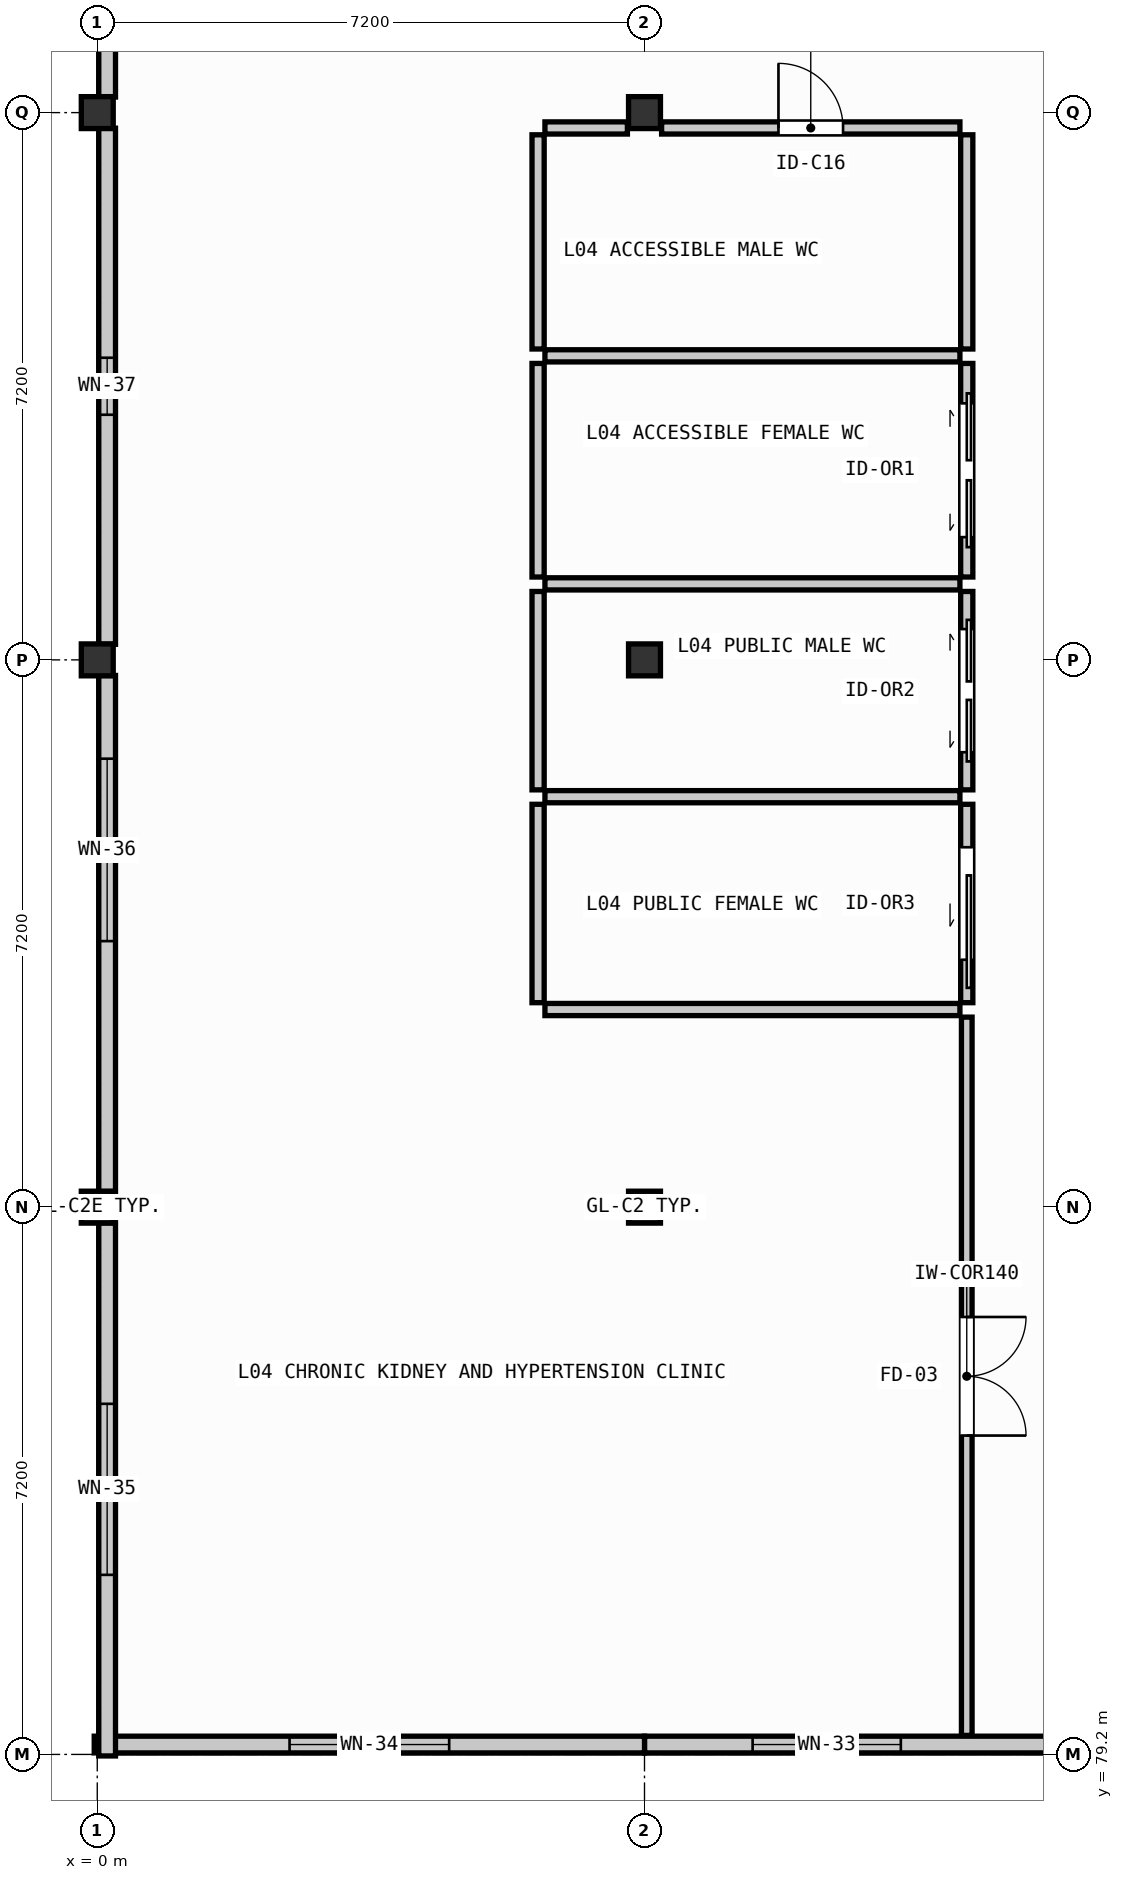
"""IFC4 building model, lengths in metres.
Left out: names, types, materials, properties, quantities, classifications, styles, units other than length and angle.
Written with IfcOpenShell. Run it as: python <this file> out.ifc"""

import sys

from ifc_helpers import new_model, si_unit, direction, frame, frame_2d, origin, origin_2d, place, context, subcontext, project, spatial, rectangle, extrude, element, fill, save


model = new_model("IFC4")
c1 = context("Model", 3, precision=1e-05, world=origin(), true_north=direction((0.0, 1.0)))
c2 = subcontext(c1, "Body", "Model", "MODEL_VIEW")
j1 = project(units=[si_unit("LENGTHUNIT", "METRE"), si_unit("PLANEANGLEUNIT", "RADIAN")], contexts=[c1])
p1 = place(None, origin())
s1 = spatial("IfcSite", under=j1, at=p1, CompositionType="ELEMENT")
p2 = place(p1, origin())
s2 = spatial("IfcBuilding", under=s1, at=p2, CompositionType="ELEMENT")
p3 = place(p2, frame((0.0, 0.0, 13.5)))
s3 = spatial("IfcBuildingStorey", under=s2, at=p3, CompositionType="ELEMENT", Elevation=13.5)
for number, where, z_axis, x_axis in (
    (1, (0.0, 86.4, 0.0), (0.0, 0.0, 1.0), (1.0, 0.0, 0.0)),
    (2, (0.0, 93.6, 0.0), (0.0, 0.0, 1.0), (1.0, 0.0, 0.0)),
    (3, (0.0, 100.8, 0.0), (0.0, 0.0, 1.0), (1.0, 0.0, 0.0)),
    (4, (7.2, 86.4, 0.0), (0.0, 0.0, 1.0), (1.0, 0.0, 0.0)),
    (5, (7.2, 93.6, 0.0), (0.0, 0.0, 1.0), (1.0, 0.0, 0.0)),
    (6, (7.2, 100.8, 0.0), (0.0, 0.0, 1.0), (1.0, 0.0, 0.0)),
):
    element("IfcColumn", number, at=place(p3, frame(where, z_axis=z_axis, x_axis=x_axis)), inside=s3, PredefinedType="COLUMN", context=c2, shape_type="SweptSolid", body=[
        extrude(rectangle(XDim=0.42, YDim=0.42, at=origin_2d()), origin(), (0.0, 0.0, 1.0), 3.99),
    ])
p4 = place(p3, frame((14.195, 79.33, 0.0), z_axis=(0.0, 0.0, 1.0), x_axis=(-1.0, 0.0, 0.0)))
e7 = element("IfcWall", 7, at=p4, inside=s3, PredefinedType="SOLIDWALL", context=c2, shape_type="SweptSolid", body=[
    extrude(rectangle(XDim=6.995, YDim=0.22, at=frame_2d((3.498, 0.0))), origin(), (0.0, 0.0, 1.0), 3.35),
])
p5 = place(p4, frame((3.623, 0.0, 0.95)))
e8 = element("IfcOpeningElement", 8, at=p5, cuts=e7, PredefinedType="OPENING", context=c2, shape_type="SweptSolid", body=[
    extrude(rectangle(XDim=1.95, YDim=1.25, at=frame_2d((0.975, 0.625))), frame((0.0, 0.12, 0.0), z_axis=(0.0, -1.0, 0.0), x_axis=(1.0, 0.0, 0.0)), (0.0, 0.0, 1.0), 0.24),
])
p6 = place(p3, frame((7.2, 79.33, 0.0), z_axis=(0.0, 0.0, 1.0), x_axis=(-1.0, 0.0, 0.0)))
e9 = element("IfcWall", 9, at=p6, inside=s3, PredefinedType="SOLIDWALL", context=c2, shape_type="SweptSolid", body=[
    extrude(rectangle(XDim=7.24, YDim=0.22, at=frame_2d((3.62, 0.0))), origin(), (0.0, 0.0, 1.0), 3.97),
])
p7 = place(p6, frame((2.57, 0.0, 0.95)))
e10 = element("IfcOpeningElement", 10, at=p7, cuts=e9, PredefinedType="OPENING", context=c2, shape_type="SweptSolid", body=[
    extrude(rectangle(XDim=2.1, YDim=1.25, at=frame_2d((1.05, 0.625))), frame((0.0, 0.12, 0.0), z_axis=(0.0, -1.0, 0.0), x_axis=(1.0, 0.0, 0.0)), (0.0, 0.0, 1.0), 0.24),
])
p8 = place(p3, frame((0.13, 79.18, 0.0), z_axis=(0.0, 0.0, 1.0), x_axis=(0.0, 1.0, 0.0)))
e11 = element("IfcWall", 11, at=p8, inside=s3, PredefinedType="SOLIDWALL", context=c2, shape_type="SweptSolid", body=[
    extrude(rectangle(XDim=7.015, YDim=0.22, at=frame_2d((3.508, 0.0))), origin(), (0.0, 0.0, 1.0), 3.27),
])
p9 = place(p8, frame((2.383, 0.0, 0.95)))
e12 = element("IfcOpeningElement", 12, at=p9, cuts=e11, PredefinedType="OPENING", context=c2, shape_type="SweptSolid", body=[
    extrude(rectangle(XDim=2.25, YDim=1.25, at=frame_2d((1.125, 0.625))), frame((0.0, 0.12, 0.0), z_axis=(0.0, -1.0, 0.0), x_axis=(1.0, 0.0, 0.0)), (0.0, 0.0, 1.0), 0.24),
])
p10 = place(p3, frame((0.13, 86.605, 0.0), z_axis=(0.0, 0.0, 1.0), x_axis=(0.0, 1.0, 0.0)))
e13 = element("IfcWall", 13, at=p10, inside=s3, PredefinedType="SOLIDWALL", context=c2, shape_type="SweptSolid", body=[
    extrude(rectangle(XDim=6.79, YDim=0.22, at=frame_2d((3.395, 0.0))), origin(), (0.0, 0.0, 1.0), 3.27),
])
p11 = place(p10, frame((3.295, 0.0, 0.95)))
e14 = element("IfcOpeningElement", 14, at=p11, cuts=e13, PredefinedType="OPENING", context=c2, shape_type="SweptSolid", body=[
    extrude(rectangle(XDim=2.4, YDim=1.25, at=frame_2d((1.2, 0.625))), frame((0.0, 0.12, 0.0), z_axis=(0.0, -1.0, 0.0), x_axis=(1.0, 0.0, 0.0)), (0.0, 0.0, 1.0), 0.24),
])
p12 = place(p3, frame((0.13, 93.805, 0.0), z_axis=(0.0, 0.0, 1.0), x_axis=(0.0, 1.0, 0.0)))
e15 = element("IfcWall", 15, at=p12, inside=s3, PredefinedType="SOLIDWALL", context=c2, shape_type="SweptSolid", body=[
    extrude(rectangle(XDim=6.79, YDim=0.22, at=frame_2d((3.395, 0.0))), origin(), (0.0, 0.0, 1.0), 3.27),
])
p13 = place(p12, frame((3.02, 0.0, 0.95)))
e16 = element("IfcOpeningElement", 16, at=p13, cuts=e15, PredefinedType="OPENING", context=c2, shape_type="SweptSolid", body=[
    extrude(rectangle(XDim=0.75, YDim=1.55, at=frame_2d((0.375, 0.775))), frame((0.0, 0.12, 0.0), z_axis=(0.0, -1.0, 0.0), x_axis=(1.0, 0.0, 0.0)), (0.0, 0.0, 1.0), 0.24),
])
p14 = place(p3, frame((0.13, 101.005, 0.0), z_axis=(0.0, 0.0, 1.0), x_axis=(0.0, 1.0, 0.0)))
e17 = element("IfcWall", 17, at=p14, inside=s3, PredefinedType="SOLIDWALL", context=c2, shape_type="SweptSolid", body=[
    extrude(rectangle(XDim=6.79, YDim=0.22, at=frame_2d((3.395, 0.0))), origin(), (0.0, 0.0, 1.0), 3.27),
])
p15 = place(p14, frame((3.495, 0.0, 0.95)))
e18 = element("IfcOpeningElement", 18, at=p15, cuts=e17, PredefinedType="OPENING", context=c2, shape_type="SweptSolid", body=[
    extrude(rectangle(XDim=0.9, YDim=1.55, at=frame_2d((0.45, 0.775))), frame((0.0, 0.12, 0.0), z_axis=(0.0, -1.0, 0.0), x_axis=(1.0, 0.0, 0.0)), (0.0, 0.0, 1.0), 0.24),
])
p16 = place(p3, frame((5.89, 100.598, 0.0), z_axis=(0.0, 0.0, 1.0), x_axis=(1.0, 0.0, 0.0)))
e19 = element("IfcWall", 19, at=p16, inside=s3, PredefinedType="PLUMBINGWALL", context=c2, shape_type="SweptSolid", body=[
    extrude(rectangle(XDim=1.085, YDim=0.16, at=frame_2d((0.542, 0.0))), origin(), (0.0, 0.0, 1.0), 3.27),
])
p17 = place(p3, frame((7.425, 100.598, 0.0), z_axis=(0.0, 0.0, 1.0), x_axis=(1.0, 0.0, 0.0)))
e20 = element("IfcWall", 20, at=p17, inside=s3, PredefinedType="PLUMBINGWALL", context=c2, shape_type="SweptSolid", body=[
    extrude(rectangle(XDim=3.925, YDim=0.16, at=frame_2d((1.962, 0.0))), origin(), (0.0, 0.0, 1.0), 3.27),
])
p18 = place(p17, frame((1.538, 0.0, 0.0)))
e21 = element("IfcOpeningElement", 21, at=p18, cuts=e20, PredefinedType="OPENING", context=c2, shape_type="SweptSolid", body=[
    extrude(rectangle(XDim=0.85, YDim=2.06, at=frame_2d((0.425, 1.03))), frame((0.0, 0.09, 0.0), z_axis=(0.0, -1.0, 0.0), x_axis=(1.0, 0.0, 0.0)), (0.0, 0.0, 1.0), 0.18),
])
p19 = place(p3, frame((11.44, 100.508, 0.0), z_axis=(0.0, 0.0, 1.0), x_axis=(0.0, -1.0, 0.0)))
e22 = element("IfcWall", 22, at=p19, inside=s3, PredefinedType="PLUMBINGWALL", context=c2, shape_type="SweptSolid", body=[
    extrude(rectangle(XDim=2.818, YDim=0.16, at=frame_2d((1.409, 0.0))), origin(), (0.0, 0.0, 1.0), 3.27),
])
p20 = place(p3, frame((11.35, 97.6, 0.0), z_axis=(0.0, 0.0, 1.0), x_axis=(-1.0, 0.0, 0.0)))
e23 = element("IfcWall", 23, at=p20, inside=s3, PredefinedType="PLUMBINGWALL", context=c2, shape_type="SweptSolid", body=[
    extrude(rectangle(XDim=5.46, YDim=0.16, at=frame_2d((2.73, 0.0))), origin(), (0.0, 0.0, 1.0), 3.35),
])
p21 = place(p3, frame((5.8, 97.69, 0.0), z_axis=(0.0, 0.0, 1.0), x_axis=(0.0, 1.0, 0.0)))
e24 = element("IfcWall", 24, at=p21, inside=s3, PredefinedType="PLUMBINGWALL", context=c2, shape_type="SweptSolid", body=[
    extrude(rectangle(XDim=2.818, YDim=0.16, at=frame_2d((1.409, 0.0))), origin(), (0.0, 0.0, 1.0), 3.27),
])
p22 = place(p3, frame((11.44, 97.5, 0.0), z_axis=(0.0, 0.0, 1.0), x_axis=(0.0, -1.0, 0.0)))
e25 = element("IfcWall", 25, at=p22, inside=s3, PredefinedType="PLUMBINGWALL", context=c2, shape_type="SweptSolid", body=[
    extrude(rectangle(XDim=2.81, YDim=0.16, at=frame_2d((1.405, 0.0))), origin(), (0.0, 0.0, 1.0), 3.97),
])
p23 = place(p22, frame((0.525, 0.0, 0.0)))
e26 = element("IfcOpeningElement", 26, at=p23, cuts=e25, PredefinedType="OPENING", context=c2, shape_type="SweptSolid", body=[
    extrude(rectangle(XDim=1.76, YDim=2.38, at=frame_2d((0.88, 1.19))), frame((0.0, 0.09, 0.0), z_axis=(0.0, -1.0, 0.0), x_axis=(1.0, 0.0, 0.0)), (0.0, 0.0, 1.0), 0.18),
])
p24 = place(p3, frame((11.35, 94.6, 0.0), z_axis=(0.0, 0.0, 1.0), x_axis=(-1.0, 0.0, 0.0)))
e27 = element("IfcWall", 27, at=p24, inside=s3, PredefinedType="PLUMBINGWALL", context=c2, shape_type="SweptSolid", body=[
    extrude(rectangle(XDim=5.46, YDim=0.16, at=frame_2d((2.73, 0.0))), origin(), (0.0, 0.0, 1.0), 3.35),
])
p25 = place(p3, frame((5.8, 94.69, 0.0), z_axis=(0.0, 0.0, 1.0), x_axis=(0.0, 1.0, 0.0)))
e28 = element("IfcWall", 28, at=p25, inside=s3, PredefinedType="PLUMBINGWALL", context=c2, shape_type="SweptSolid", body=[
    extrude(rectangle(XDim=2.81, YDim=0.16, at=frame_2d((1.405, 0.0))), origin(), (0.0, 0.0, 1.0), 3.97),
])
p26 = place(p3, frame((11.44, 94.5, 0.0), z_axis=(0.0, 0.0, 1.0), x_axis=(0.0, -1.0, 0.0)))
e29 = element("IfcWall", 29, at=p26, inside=s3, PredefinedType="PLUMBINGWALL", context=c2, shape_type="SweptSolid", body=[
    extrude(rectangle(XDim=2.61, YDim=0.16, at=frame_2d((1.305, 0.0))), origin(), (0.0, 0.0, 1.0), 3.27),
])
p27 = place(p26, frame((0.495, 0.0, 0.0)))
e30 = element("IfcOpeningElement", 30, at=p27, cuts=e29, PredefinedType="OPENING", context=c2, shape_type="SweptSolid", body=[
    extrude(rectangle(XDim=1.62, YDim=2.34, at=frame_2d((0.81, 1.17))), frame((0.0, 0.09, 0.0), z_axis=(0.0, -1.0, 0.0), x_axis=(1.0, 0.0, 0.0)), (0.0, 0.0, 1.0), 0.18),
])
p28 = place(p3, frame((11.35, 91.8, 0.0), z_axis=(0.0, 0.0, 1.0), x_axis=(-1.0, 0.0, 0.0)))
e31 = element("IfcWall", 31, at=p28, inside=s3, PredefinedType="PLUMBINGWALL", context=c2, shape_type="SweptSolid", body=[
    extrude(rectangle(XDim=5.46, YDim=0.16, at=frame_2d((2.73, 0.0))), origin(), (0.0, 0.0, 1.0), 3.35),
])
p29 = place(p3, frame((5.8, 91.89, 0.0), z_axis=(0.0, 0.0, 1.0), x_axis=(0.0, 1.0, 0.0)))
e32 = element("IfcWall", 32, at=p29, inside=s3, PredefinedType="PLUMBINGWALL", context=c2, shape_type="SweptSolid", body=[
    extrude(rectangle(XDim=2.61, YDim=0.16, at=frame_2d((1.305, 0.0))), origin(), (0.0, 0.0, 1.0), 3.27),
])
p30 = place(p3, frame((11.44, 91.7, 0.0), z_axis=(0.0, 0.0, 1.0), x_axis=(0.0, -1.0, 0.0)))
e33 = element("IfcWall", 33, at=p30, inside=s3, PredefinedType="PLUMBINGWALL", context=c2, shape_type="SweptSolid", body=[
    extrude(rectangle(XDim=2.61, YDim=0.16, at=frame_2d((1.305, 0.0))), origin(), (0.0, 0.0, 1.0), 3.97),
])
p31 = place(p30, frame((0.565, 0.0, 0.0)))
e34 = element("IfcOpeningElement", 34, at=p31, cuts=e33, PredefinedType="OPENING", context=c2, shape_type="SweptSolid", body=[
    extrude(rectangle(XDim=1.48, YDim=2.3, at=frame_2d((0.74, 1.15))), frame((0.0, 0.09, 0.0), z_axis=(0.0, -1.0, 0.0), x_axis=(1.0, 0.0, 0.0)), (0.0, 0.0, 1.0), 0.18),
])
p32 = place(p3, frame((11.35, 89.0, 0.0), z_axis=(0.0, 0.0, 1.0), x_axis=(-1.0, 0.0, 0.0)))
e35 = element("IfcWall", 35, at=p32, inside=s3, PredefinedType="PLUMBINGWALL", context=c2, shape_type="SweptSolid", body=[
    extrude(rectangle(XDim=5.46, YDim=0.16, at=frame_2d((2.73, 0.0))), origin(), (0.0, 0.0, 1.0), 3.35),
])
p33 = place(p3, frame((5.8, 89.09, 0.0), z_axis=(0.0, 0.0, 1.0), x_axis=(0.0, 1.0, 0.0)))
e36 = element("IfcWall", 36, at=p33, inside=s3, PredefinedType="PLUMBINGWALL", context=c2, shape_type="SweptSolid", body=[
    extrude(rectangle(XDim=2.61, YDim=0.16, at=frame_2d((1.305, 0.0))), origin(), (0.0, 0.0, 1.0), 3.97),
])
p34 = place(p3, frame((11.44, 88.9, 0.0), z_axis=(0.0, 0.0, 1.0), x_axis=(0.0, -1.0, 0.0)))
e37 = element("IfcWall", 37, at=p34, inside=s3, PredefinedType="PARTITIONING", context=c2, shape_type="SweptSolid", body=[
    extrude(rectangle(XDim=9.45, YDim=0.14, at=frame_2d((4.725, 0.0))), origin(), (0.0, 0.0, 1.0), 3.27),
])
p35 = place(p34, frame((3.945, 0.0, 0.0)))
e38 = element("IfcOpeningElement", 38, at=p35, cuts=e37, PredefinedType="OPENING", context=c2, shape_type="SweptSolid", body=[
    extrude(rectangle(XDim=1.56, YDim=2.22, at=frame_2d((0.78, 1.11))), frame((0.0, 0.08, 0.0), z_axis=(0.0, -1.0, 0.0), x_axis=(1.0, 0.0, 0.0)), (0.0, 0.0, 1.0), 0.16),
])
p36 = place(p5, origin())
e39 = element("IfcWindow", 39, at=p36, inside=s3, PartitioningType="SINGLE_PANEL", PredefinedType="WINDOW", context=c2, shape_type="SweptSolid", body=[
    extrude(rectangle(XDim=1.95, YDim=1.25, at=frame_2d((0.975, 0.625))), frame((0.0, 0.03, 0.0), z_axis=(0.0, -1.0, 0.0), x_axis=(1.0, 0.0, 0.0)), (0.0, 0.0, 1.0), 0.06),
])
fill(e8, e39)
p37 = place(p7, origin())
e40 = element("IfcWindow", 40, at=p37, inside=s3, PartitioningType="SINGLE_PANEL", PredefinedType="WINDOW", context=c2, shape_type="SweptSolid", body=[
    extrude(rectangle(XDim=2.1, YDim=1.25, at=frame_2d((1.05, 0.625))), frame((0.0, 0.03, 0.0), z_axis=(0.0, -1.0, 0.0), x_axis=(1.0, 0.0, 0.0)), (0.0, 0.0, 1.0), 0.06),
])
fill(e10, e40)
p38 = place(p9, origin())
e41 = element("IfcWindow", 41, at=p38, inside=s3, PartitioningType="SINGLE_PANEL", PredefinedType="WINDOW", context=c2, shape_type="SweptSolid", body=[
    extrude(rectangle(XDim=2.25, YDim=1.25, at=frame_2d((1.125, 0.625))), frame((0.0, 0.03, 0.0), z_axis=(0.0, -1.0, 0.0), x_axis=(1.0, 0.0, 0.0)), (0.0, 0.0, 1.0), 0.06),
])
fill(e12, e41)
p39 = place(p11, origin())
e42 = element("IfcWindow", 42, at=p39, inside=s3, PartitioningType="SINGLE_PANEL", PredefinedType="WINDOW", context=c2, shape_type="SweptSolid", body=[
    extrude(rectangle(XDim=2.4, YDim=1.25, at=frame_2d((1.2, 0.625))), frame((0.0, 0.03, 0.0), z_axis=(0.0, -1.0, 0.0), x_axis=(1.0, 0.0, 0.0)), (0.0, 0.0, 1.0), 0.06),
])
fill(e14, e42)
p40 = place(p13, origin())
e43 = element("IfcWindow", 43, at=p40, inside=s3, PartitioningType="SINGLE_PANEL", PredefinedType="WINDOW", context=c2, shape_type="SweptSolid", body=[
    extrude(rectangle(XDim=0.75, YDim=1.55, at=frame_2d((0.375, 0.775))), frame((0.0, 0.03, 0.0), z_axis=(0.0, -1.0, 0.0), x_axis=(1.0, 0.0, 0.0)), (0.0, 0.0, 1.0), 0.06),
])
fill(e16, e43)
p41 = place(p18, origin())
e44 = element("IfcDoor", 44, at=p41, inside=s3, OperationType="SINGLE_SWING_LEFT", PredefinedType="DOOR", context=c2, shape_type="SweptSolid", body=[
    extrude(rectangle(XDim=0.85, YDim=2.06, at=frame_2d((0.425, 1.03))), frame((0.0, 0.025, 0.0), z_axis=(0.0, -1.0, 0.0), x_axis=(1.0, 0.0, 0.0)), (0.0, 0.0, 1.0), 0.05),
])
fill(e21, e44)
p42 = place(p23, origin())
e45 = element("IfcDoor", 45, at=p42, inside=s3, OperationType="DOUBLE_DOOR_SLIDING", PredefinedType="DOOR", context=c2, shape_type="SweptSolid", body=[
    extrude(rectangle(XDim=1.76, YDim=2.38, at=frame_2d((0.88, 1.19))), frame((0.0, 0.025, 0.0), z_axis=(0.0, -1.0, 0.0), x_axis=(1.0, 0.0, 0.0)), (0.0, 0.0, 1.0), 0.05),
])
fill(e26, e45)
p43 = place(p27, origin())
e46 = element("IfcDoor", 46, at=p43, inside=s3, OperationType="DOUBLE_DOOR_SLIDING", PredefinedType="DOOR", context=c2, shape_type="SweptSolid", body=[
    extrude(rectangle(XDim=1.62, YDim=2.34, at=frame_2d((0.81, 1.17))), frame((0.0, 0.025, 0.0), z_axis=(0.0, -1.0, 0.0), x_axis=(1.0, 0.0, 0.0)), (0.0, 0.0, 1.0), 0.05),
])
fill(e30, e46)
p44 = place(p31, origin())
e47 = element("IfcDoor", 47, at=p44, inside=s3, OperationType="SLIDING_TO_RIGHT", PredefinedType="DOOR", context=c2, shape_type="SweptSolid", body=[
    extrude(rectangle(XDim=1.48, YDim=2.3, at=frame_2d((0.74, 1.15))), frame((0.0, 0.025, 0.0), z_axis=(0.0, -1.0, 0.0), x_axis=(1.0, 0.0, 0.0)), (0.0, 0.0, 1.0), 0.05),
])
fill(e34, e47)
p45 = place(p35, origin())
e48 = element("IfcDoor", 48, at=p45, inside=s3, OperationType="DOUBLE_DOOR_SINGLE_SWING", PredefinedType="DOOR", context=c2, shape_type="SweptSolid", body=[
    extrude(rectangle(XDim=1.56, YDim=2.22, at=frame_2d((0.78, 1.11))), frame((0.0, 0.025, 0.0), z_axis=(0.0, -1.0, 0.0), x_axis=(1.0, 0.0, 0.0)), (0.0, 0.0, 1.0), 0.05),
])
fill(e38, e48)
save(model, sys.argv[1])
